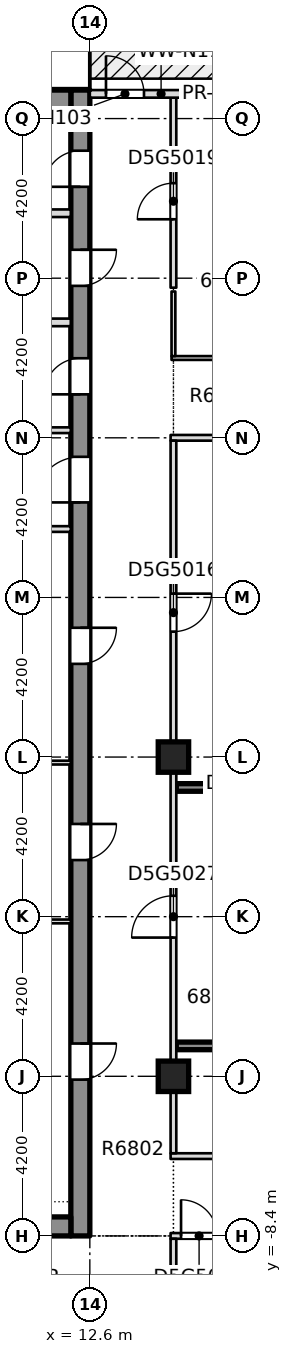
"""IFC4 building model, lengths in metres.
Left out: names, types, materials, properties, quantities, classifications, styles, units other than length and angle.
Written with IfcOpenShell. Run it as: python <this file> out.ifc"""

import sys

from ifc_helpers import new_model, si_unit, direction, frame, frame_2d, origin, origin_2d, place, context, subcontext, project, spatial, rectangle, extrude, element, fill, save


model = new_model("IFC4")
c1 = context("Model", 3, precision=1e-05, world=origin(), true_north=direction((0.0, 1.0)))
c2 = subcontext(c1, "Body", "Model", "MODEL_VIEW")
j1 = project(units=[si_unit("LENGTHUNIT", "METRE"), si_unit("PLANEANGLEUNIT", "RADIAN")], contexts=[c1])
p1 = place(None, origin())
s1 = spatial("IfcSite", under=j1, at=p1, CompositionType="ELEMENT")
p2 = place(p1, origin())
s2 = spatial("IfcBuilding", under=s1, at=p2, CompositionType="ELEMENT")
p3 = place(p2, frame((0.0, 0.0, 257.95)))
s3 = spatial("IfcBuildingStorey", under=s2, at=p3, CompositionType="ELEMENT", Elevation=257.95)
p4 = place(p3, frame((12.35, -8.4, -0.4), z_axis=(0.0, 0.0, 1.0), x_axis=(0.0, 1.0, 0.0)))
e1 = element("IfcWall", 1, at=p4, inside=s3, PredefinedType="SHEAR", context=c2, shape_type="SweptSolid", body=[
    extrude(rectangle(XDim=30.15, YDim=0.5, at=frame_2d((15.075, 0.0))), origin(), (0.0, 0.0, 1.0), 3.45),
])
p5 = place(p4, frame((4.113, 0.0, 0.4)))
e2 = element("IfcOpeningElement", 2, at=p5, cuts=e1, PredefinedType="OPENING", context=c2, shape_type="SweptSolid", body=[
    extrude(rectangle(XDim=0.95, YDim=2.1, at=frame_2d((0.475, 1.05))), frame((0.0, 0.26, 0.0), z_axis=(0.0, -1.0, 0.0), x_axis=(1.0, 0.0, 0.0)), (0.0, 0.0, 1.0), 0.52),
])
p6 = place(p4, frame((9.89, 0.0, 0.4)))
e3 = element("IfcOpeningElement", 3, at=p6, cuts=e1, PredefinedType="OPENING", context=c2, shape_type="SweptSolid", body=[
    extrude(rectangle(XDim=0.95, YDim=2.1, at=frame_2d((0.475, 1.05))), frame((0.0, 0.26, 0.0), z_axis=(0.0, -1.0, 0.0), x_axis=(1.0, 0.0, 0.0)), (0.0, 0.0, 1.0), 0.52),
])
p7 = place(p4, frame((15.052, 0.0, 0.4)))
e4 = element("IfcOpeningElement", 4, at=p7, cuts=e1, PredefinedType="OPENING", context=c2, shape_type="SweptSolid", body=[
    extrude(rectangle(XDim=0.95, YDim=2.1, at=frame_2d((0.475, 1.05))), frame((0.0, 0.26, 0.0), z_axis=(0.0, -1.0, 0.0), x_axis=(1.0, 0.0, 0.0)), (0.0, 0.0, 1.0), 0.52),
])
p8 = place(p4, frame((22.144, 0.0, 0.4)))
e5 = element("IfcOpeningElement", 5, at=p8, cuts=e1, PredefinedType="OPENING", context=c2, shape_type="SweptSolid", body=[
    extrude(rectangle(XDim=0.95, YDim=2.1, at=frame_2d((0.475, 1.05))), frame((0.0, 0.26, 0.0), z_axis=(0.0, -1.0, 0.0), x_axis=(1.0, 0.0, 0.0)), (0.0, 0.0, 1.0), 0.52),
])
p9 = place(p4, frame((24.998, 0.0, 0.4)))
e6 = element("IfcOpeningElement", 6, at=p9, cuts=e1, PredefinedType="OPENING", context=c2, shape_type="SweptSolid", body=[
    extrude(rectangle(XDim=0.95, YDim=2.1, at=frame_2d((0.475, 1.05))), frame((0.0, 0.26, 0.0), z_axis=(0.0, -1.0, 0.0), x_axis=(1.0, 0.0, 0.0)), (0.0, 0.0, 1.0), 0.52),
])
p10 = place(p4, frame((27.605, 0.0, 0.4)))
e7 = element("IfcOpeningElement", 7, at=p10, cuts=e1, PredefinedType="OPENING", context=c2, shape_type="SweptSolid", body=[
    extrude(rectangle(XDim=0.95, YDim=2.1, at=frame_2d((0.475, 1.05))), frame((0.0, 0.26, 0.0), z_axis=(0.0, -1.0, 0.0), x_axis=(1.0, 0.0, 0.0)), (0.0, 0.0, 1.0), 0.52),
])
p11 = place(p4, frame((19.3, 0.0, 0.4)))
e8 = element("IfcOpeningElement", 8, at=p11, cuts=e1, PredefinedType="OPENING", context=c2, shape_type="SweptSolid", body=[
    extrude(rectangle(XDim=1.2, YDim=2.1, at=frame_2d((0.6, 1.05))), frame((0.0, 0.26, 0.0), z_axis=(0.0, -1.0, 0.0), x_axis=(1.0, 0.0, 0.0)), (0.0, 0.0, 1.0), 0.52),
])
p12 = place(p3, frame((-12.1, -8.15, -0.4), z_axis=(0.0, 0.0, 1.0), x_axis=(1.0, 0.0, 0.0)))
e9 = element("IfcWall", 9, at=p12, inside=s3, PredefinedType="SHEAR", context=c2, shape_type="SweptSolid", body=[
    extrude(rectangle(XDim=24.2, YDim=0.5, at=frame_2d((12.1, 0.0))), origin(), (0.0, 0.0, 1.0), 3.45),
])
p13 = place(p12, frame((7.35, 0.0, 0.4)))
e10 = element("IfcOpeningElement", 10, at=p13, cuts=e9, PredefinedType="OPENING", context=c2, shape_type="SweptSolid", body=[
    extrude(rectangle(XDim=1.8, YDim=2.1, at=frame_2d((0.9, 1.05))), frame((0.0, 0.26, 0.0), z_axis=(0.0, -1.0, 0.0), x_axis=(1.0, 0.0, 0.0)), (0.0, 0.0, 1.0), 0.52),
])
p14 = place(p12, frame((15.05, 0.0, 0.4)))
e11 = element("IfcOpeningElement", 11, at=p14, cuts=e9, PredefinedType="OPENING", context=c2, shape_type="SweptSolid", body=[
    extrude(rectangle(XDim=1.8, YDim=2.1, at=frame_2d((0.9, 1.05))), frame((0.0, 0.26, 0.0), z_axis=(0.0, -1.0, 0.0), x_axis=(1.0, 0.0, 0.0)), (0.0, 0.0, 1.0), 0.52),
])
p15 = place(p3, frame((-12.1, 21.5, -0.4), z_axis=(0.0, 0.0, 1.0), x_axis=(1.0, 0.0, 0.0)))
e12 = element("IfcWall", 12, at=p15, inside=s3, PredefinedType="SHEAR", context=c2, shape_type="SweptSolid", body=[
    extrude(rectangle(XDim=24.2, YDim=0.5, at=frame_2d((12.1, 0.0))), origin(), (0.0, 0.0, 1.0), 3.45),
])
for number, where, z_axis, x_axis in (
    (13, (14.8, -4.2, -0.4), (0.0, 0.0, 1.0), (1.0, 0.0, 0.0)),
    (14, (14.8, 4.2, -0.4), (0.0, 0.0, 1.0), (1.0, 0.0, 0.0)),
):
    element("IfcColumn", number, at=place(p3, frame(where, z_axis=z_axis, x_axis=x_axis)), inside=s3, PredefinedType="COLUMN", context=c2, shape_type="SweptSolid", body=[
        extrude(rectangle(XDim=0.8, YDim=0.8, at=origin_2d()), origin(), (0.0, 0.0, 1.0), 3.45),
    ])
p16 = place(p3, frame((14.725, -8.4, 0.0), z_axis=(0.0, 0.0, 1.0), x_axis=(1.0, 0.0, 0.0)))
e15 = element("IfcWall", 15, at=p16, inside=s3, PredefinedType="PARTITIONING", context=c2, shape_type="SweptSolid", body=[
    extrude(rectangle(XDim=11.025, YDim=0.15, at=frame_2d((5.512, 0.0))), origin(), (0.0, 0.0, 1.0), 3.05),
])
p17 = place(p16, frame((0.275, 0.0, 0.0)))
e16 = element("IfcOpeningElement", 16, at=p17, cuts=e15, PredefinedType="OPENING", context=c2, shape_type="SweptSolid", body=[
    extrude(rectangle(XDim=0.95, YDim=2.1, at=frame_2d((0.475, 1.05))), frame((0.0, 0.085, 0.0), z_axis=(0.0, -1.0, 0.0), x_axis=(1.0, 0.0, 0.0)), (0.0, 0.0, 1.0), 0.17),
])
p18 = place(p3, frame((14.725, -6.3, 0.0), z_axis=(0.0, 0.0, 1.0), x_axis=(1.0, 0.0, 0.0)))
e17 = element("IfcWall", 17, at=p18, inside=s3, PredefinedType="PARTITIONING", context=c2, shape_type="SweptSolid", body=[
    extrude(rectangle(XDim=11.025, YDim=0.15, at=frame_2d((5.512, 0.0))), origin(), (0.0, 0.0, 1.0), 3.05),
])
p19 = place(p18, frame((5.15, 0.0, 0.0)))
e18 = element("IfcOpeningElement", 18, at=p19, cuts=e17, PredefinedType="OPENING", context=c2, shape_type="SweptSolid", body=[
    extrude(rectangle(XDim=1.0, YDim=2.1, at=frame_2d((0.5, 1.05))), frame((0.0, 0.085, 0.0), z_axis=(0.0, -1.0, 0.0), x_axis=(1.0, 0.0, 0.0)), (0.0, 0.0, 1.0), 0.17),
])
p20 = place(p3, frame((14.875, -3.4, 0.0), z_axis=(0.0, 0.0, 1.0), x_axis=(1.0, 0.0, 0.0)))
e19 = element("IfcWall", 19, at=p20, inside=s3, PredefinedType="SOLIDWALL", context=c2, shape_type="SweptSolid", body=[
    extrude(rectangle(XDim=8.725, YDim=0.2, at=frame_2d((4.363, 0.0))), origin(), (0.0, 0.0, 1.0), 3.05),
])
p21 = place(p3, frame((14.875, 3.4, 0.0), z_axis=(0.0, 0.0, 1.0), x_axis=(1.0, 0.0, 0.0)))
e20 = element("IfcWall", 20, at=p21, inside=s3, PredefinedType="SOLIDWALL", context=c2, shape_type="SweptSolid", body=[
    extrude(rectangle(XDim=5.575, YDim=0.2, at=frame_2d((2.788, 0.0))), origin(), (0.0, 0.0, 1.0), 3.05),
])
p22 = place(p3, frame((14.725, 12.6, 0.0), z_axis=(0.0, 0.0, 1.0), x_axis=(1.0, 0.0, 0.0)))
e21 = element("IfcWall", 21, at=p22, inside=s3, PredefinedType="PARTITIONING", context=c2, shape_type="SweptSolid", body=[
    extrude(rectangle(XDim=2.525, YDim=0.15, at=frame_2d((1.262, 0.0))), origin(), (0.0, 0.0, 1.0), 3.05),
])
p23 = place(p3, frame((14.75, 14.7, 0.0), z_axis=(0.0, 0.0, 1.0), x_axis=(1.0, 0.0, 0.0)))
e22 = element("IfcWall", 22, at=p23, inside=s3, PredefinedType="PARTITIONING", context=c2, shape_type="SweptSolid", body=[
    extrude(rectangle(XDim=2.5, YDim=0.1, at=frame_2d((1.25, 0.0))), origin(), (0.0, 0.0, 1.0), 3.05),
])
p24 = place(p3, frame((14.8, -10.525, 0.0), z_axis=(0.0, 0.0, 1.0), x_axis=(0.0, 1.0, 0.0)))
e23 = element("IfcWall", 23, at=p24, inside=s3, PredefinedType="PARTITIONING", context=c2, shape_type="SweptSolid", body=[
    extrude(rectangle(XDim=2.05, YDim=0.15, at=frame_2d((1.025, 0.0))), origin(), (0.0, 0.0, 1.0), 3.05),
])
p25 = place(p3, frame((14.8, -6.225, 0.0), z_axis=(0.0, 0.0, 1.0), x_axis=(0.0, 1.0, 0.0)))
e24 = element("IfcWall", 24, at=p25, inside=s3, PredefinedType="PARTITIONING", context=c2, shape_type="SweptSolid", body=[
    extrude(rectangle(XDim=18.75, YDim=0.15, at=frame_2d((9.375, 0.0))), origin(), (0.0, 0.0, 1.0), 3.05),
])
p26 = place(p25, frame((13.725, 0.0, 0.0)))
e25 = element("IfcOpeningElement", 25, at=p26, cuts=e24, PredefinedType="OPENING", context=c2, shape_type="SweptSolid", body=[
    extrude(rectangle(XDim=1.0, YDim=2.1, at=frame_2d((0.5, 1.05))), frame((0.0, 0.085, 0.0), z_axis=(0.0, -1.0, 0.0), x_axis=(1.0, 0.0, 0.0)), (0.0, 0.0, 1.0), 0.17),
])
p27 = place(p25, frame((5.675, 0.0, 0.0)))
e26 = element("IfcOpeningElement", 26, at=p27, cuts=e24, PredefinedType="OPENING", context=c2, shape_type="SweptSolid", body=[
    extrude(rectangle(XDim=1.1, YDim=2.1, at=frame_2d((0.55, 1.05))), frame((0.0, 0.085, 0.0), z_axis=(0.0, -1.0, 0.0), x_axis=(1.0, 0.0, 0.0)), (0.0, 0.0, 1.0), 0.17),
])
p28 = place(p3, frame((14.8, 14.75, 0.0), z_axis=(0.0, 0.0, 1.0), x_axis=(0.0, 1.0, 0.0)))
e27 = element("IfcWall", 27, at=p28, inside=s3, PredefinedType="PARTITIONING", context=c2, shape_type="SweptSolid", body=[
    extrude(rectangle(XDim=1.7, YDim=0.1, at=frame_2d((0.85, 0.0))), origin(), (0.0, 0.0, 1.0), 3.05),
])
p29 = place(p3, frame((14.8, 16.55, 0.0), z_axis=(0.0, 0.0, 1.0), x_axis=(0.0, 1.0, 0.0)))
e28 = element("IfcWall", 28, at=p29, inside=s3, PredefinedType="PARTITIONING", context=c2, shape_type="SweptSolid", body=[
    extrude(rectangle(XDim=5.0, YDim=0.15, at=frame_2d((2.5, 0.0))), origin(), (0.0, 0.0, 1.0), 3.05),
])
p30 = place(p29, frame((1.8, 0.0, 0.0)))
e29 = element("IfcOpeningElement", 29, at=p30, cuts=e28, PredefinedType="OPENING", context=c2, shape_type="SweptSolid", body=[
    extrude(rectangle(XDim=0.95, YDim=2.1, at=frame_2d((0.475, 1.05))), frame((0.0, 0.085, 0.0), z_axis=(0.0, -1.0, 0.0), x_axis=(1.0, 0.0, 0.0)), (0.0, 0.0, 1.0), 0.17),
])
p31 = place(p3, frame((16.35, 21.65, 0.0), z_axis=(0.0, 0.0, 1.0), x_axis=(-1.0, 0.0, 0.0)))
e30 = element("IfcWall", 30, at=p31, inside=s3, PredefinedType="STANDARD", context=c2, shape_type="SweptSolid", body=[
    extrude(rectangle(XDim=3.75, YDim=0.2, at=frame_2d((1.875, 0.0))), origin(), (0.0, 0.0, 1.0), 3.05),
])
p32 = place(p31, frame((2.325, 0.0, 0.0)))
e31 = element("IfcOpeningElement", 31, at=p32, cuts=e30, PredefinedType="OPENING", context=c2, shape_type="SweptSolid", body=[
    extrude(rectangle(XDim=1.0, YDim=2.4, at=frame_2d((0.5, 1.2))), frame((0.0, 0.11, 0.0), z_axis=(0.0, -1.0, 0.0), x_axis=(1.0, 0.0, 0.0)), (0.0, 0.0, 1.0), 0.22),
])
for number, where, z_axis, x_axis in (
    (32, (8.651, -0.125, 0.0), (0.0, 0.0, 1.0), (1.0, 0.0, 0.0)),
    (33, (8.651, 4.054, 0.0), (0.0, 0.0, 1.0), (1.0, 0.0, 0.0)),
):
    element("IfcWall", number, at=place(p3, frame(where, z_axis=z_axis, x_axis=x_axis)), inside=s3, PredefinedType="PARTITIONING", context=c2, shape_type="SweptSolid", body=[
        extrude(rectangle(XDim=3.448, YDim=0.1, at=frame_2d((1.724, 0.0))), origin(), (0.0, 0.0, 1.0), 3.05),
    ])
for number, where, z_axis, x_axis in (
    (34, (8.651, 10.2, 0.0), (0.0, 0.0, 1.0), (1.0, 0.0, 0.0)),
    (35, (8.651, 12.8, 0.0), (0.0, 0.0, 1.0), (1.0, 0.0, 0.0)),
):
    element("IfcWall", number, at=place(p3, frame(where, z_axis=z_axis, x_axis=x_axis)), inside=s3, PredefinedType="PARTITIONING", context=c2, shape_type="SweptSolid", body=[
        extrude(rectangle(XDim=3.448, YDim=0.15, at=frame_2d((1.724, 0.0))), origin(), (0.0, 0.0, 1.0), 3.05),
    ])
for number, where, z_axis, x_axis in (
    (36, (8.651, 15.637, 0.0), (0.0, 0.0, 1.0), (1.0, 0.0, 0.0)),
    (37, (8.651, 18.509, 0.0), (0.0, 0.0, 1.0), (1.0, 0.0, 0.0)),
):
    element("IfcWall", number, at=place(p3, frame(where, z_axis=z_axis, x_axis=x_axis)), inside=s3, PredefinedType="PARTITIONING", context=c2, shape_type="SweptSolid", body=[
        extrude(rectangle(XDim=3.448, YDim=0.2, at=frame_2d((1.724, 0.0))), origin(), (0.0, 0.0, 1.0), 3.05),
    ])
p33 = place(p17, origin())
e38 = element("IfcDoor", 38, at=p33, inside=s3, OperationType="SINGLE_SWING_RIGHT", PredefinedType="DOOR", context=c2, shape_type="SweptSolid", body=[
    extrude(rectangle(XDim=0.95, YDim=2.1, at=frame_2d((0.475, 1.05))), frame((0.0, 0.025, 0.0), z_axis=(0.0, -1.0, 0.0), x_axis=(1.0, 0.0, 0.0)), (0.0, 0.0, 1.0), 0.05),
])
fill(e16, e38)
p34 = place(p26, origin())
e39 = element("IfcDoor", 39, at=p34, inside=s3, OperationType="SINGLE_SWING_RIGHT", PredefinedType="DOOR", context=c2, shape_type="SweptSolid", body=[
    extrude(rectangle(XDim=1.0, YDim=2.1, at=frame_2d((0.5, 1.05))), frame((0.0, 0.025, 0.0), z_axis=(0.0, -1.0, 0.0), x_axis=(1.0, 0.0, 0.0)), (0.0, 0.0, 1.0), 0.05),
])
fill(e25, e39)
p35 = place(p30, origin())
e40 = element("IfcDoor", 40, at=p35, inside=s3, OperationType="SINGLE_SWING_LEFT", PredefinedType="DOOR", context=c2, shape_type="SweptSolid", body=[
    extrude(rectangle(XDim=0.95, YDim=2.1, at=frame_2d((0.475, 1.05))), frame((0.0, 0.025, 0.0), z_axis=(0.0, -1.0, 0.0), x_axis=(1.0, 0.0, 0.0)), (0.0, 0.0, 1.0), 0.05),
])
fill(e29, e40)
p36 = place(p27, origin())
e41 = element("IfcDoor", 41, at=p36, inside=s3, OperationType="SINGLE_SWING_LEFT", PredefinedType="DOOR", context=c2, shape_type="SweptSolid", body=[
    extrude(rectangle(XDim=1.1, YDim=2.1, at=frame_2d((0.55, 1.05))), frame((0.0, 0.025, 0.0), z_axis=(0.0, -1.0, 0.0), x_axis=(1.0, 0.0, 0.0)), (0.0, 0.0, 1.0), 0.05),
])
fill(e26, e41)
p37 = place(p32, origin())
e42 = element("IfcDoor", 42, at=p37, inside=s3, OperationType="SINGLE_SWING_LEFT", PredefinedType="DOOR", context=c2, shape_type="SweptSolid", body=[
    extrude(rectangle(XDim=1.0, YDim=2.4, at=frame_2d((0.5, 1.2))), frame((0.0, 0.025, 0.0), z_axis=(0.0, -1.0, 0.0), x_axis=(1.0, 0.0, 0.0)), (0.0, 0.0, 1.0), 0.05),
])
fill(e31, e42)
p38 = place(p5, origin())
e43 = element("IfcDoor", 43, at=p38, inside=s3, OperationType="SINGLE_SWING_LEFT", PredefinedType="DOOR", context=c2, shape_type="SweptSolid", body=[
    extrude(rectangle(XDim=0.95, YDim=2.1, at=frame_2d((0.475, 1.05))), frame((0.0, 0.025, 0.0), z_axis=(0.0, -1.0, 0.0), x_axis=(1.0, 0.0, 0.0)), (0.0, 0.0, 1.0), 0.05),
])
fill(e2, e43)
p39 = place(p6, origin())
e44 = element("IfcDoor", 44, at=p39, inside=s3, OperationType="SINGLE_SWING_LEFT", PredefinedType="DOOR", context=c2, shape_type="SweptSolid", body=[
    extrude(rectangle(XDim=0.95, YDim=2.1, at=frame_2d((0.475, 1.05))), frame((0.0, 0.025, 0.0), z_axis=(0.0, -1.0, 0.0), x_axis=(1.0, 0.0, 0.0)), (0.0, 0.0, 1.0), 0.05),
])
fill(e3, e44)
p40 = place(p7, origin())
e45 = element("IfcDoor", 45, at=p40, inside=s3, OperationType="SINGLE_SWING_LEFT", PredefinedType="DOOR", context=c2, shape_type="SweptSolid", body=[
    extrude(rectangle(XDim=0.95, YDim=2.1, at=frame_2d((0.475, 1.05))), frame((0.0, 0.025, 0.0), z_axis=(0.0, -1.0, 0.0), x_axis=(1.0, 0.0, 0.0)), (0.0, 0.0, 1.0), 0.05),
])
fill(e4, e45)
p41 = place(p8, origin())
e46 = element("IfcDoor", 46, at=p41, inside=s3, OperationType="SINGLE_SWING_LEFT", PredefinedType="DOOR", context=c2, shape_type="SweptSolid", body=[
    extrude(rectangle(XDim=0.95, YDim=2.1, at=frame_2d((0.475, 1.05))), frame((0.0, 0.025, 0.0), z_axis=(0.0, -1.0, 0.0), x_axis=(1.0, 0.0, 0.0)), (0.0, 0.0, 1.0), 0.05),
])
fill(e5, e46)
p42 = place(p9, origin())
e47 = element("IfcDoor", 47, at=p42, inside=s3, OperationType="SINGLE_SWING_LEFT", PredefinedType="DOOR", context=c2, shape_type="SweptSolid", body=[
    extrude(rectangle(XDim=0.95, YDim=2.1, at=frame_2d((0.475, 1.05))), frame((0.0, 0.025, 0.0), z_axis=(0.0, -1.0, 0.0), x_axis=(1.0, 0.0, 0.0)), (0.0, 0.0, 1.0), 0.05),
])
fill(e6, e47)
p43 = place(p10, origin())
e48 = element("IfcDoor", 48, at=p43, inside=s3, OperationType="SINGLE_SWING_LEFT", PredefinedType="DOOR", context=c2, shape_type="SweptSolid", body=[
    extrude(rectangle(XDim=0.95, YDim=2.1, at=frame_2d((0.475, 1.05))), frame((0.0, 0.025, 0.0), z_axis=(0.0, -1.0, 0.0), x_axis=(1.0, 0.0, 0.0)), (0.0, 0.0, 1.0), 0.05),
])
fill(e7, e48)
p44 = place(p11, origin())
e49 = element("IfcDoor", 49, at=p44, inside=s3, OperationType="SINGLE_SWING_LEFT", PredefinedType="DOOR", context=c2, shape_type="SweptSolid", body=[
    extrude(rectangle(XDim=1.2, YDim=2.1, at=frame_2d((0.6, 1.05))), frame((0.0, 0.025, 0.0), z_axis=(0.0, -1.0, 0.0), x_axis=(1.0, 0.0, 0.0)), (0.0, 0.0, 1.0), 0.05),
])
fill(e8, e49)
save(model, sys.argv[1])
